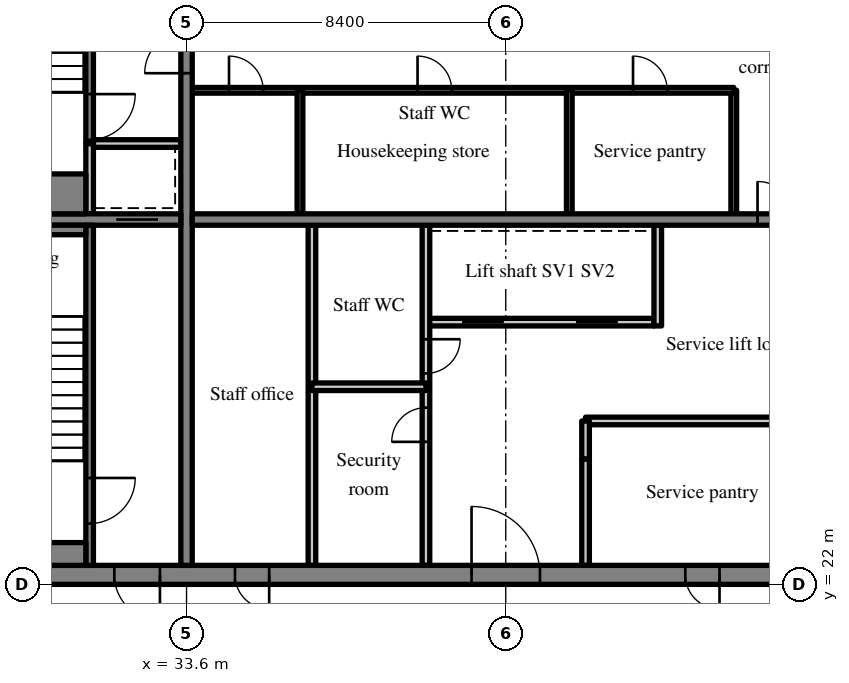
"""IFC4 building model, lengths in metres.
Left out: names, types, materials, properties, quantities, classifications, styles, units other than length and angle.
Written with IfcOpenShell. Run it as: python <this file> out.ifc"""

import sys

from ifc_helpers import new_model, si_unit, direction, frame, frame_2d, origin, place, context, subcontext, project, spatial, rectangle, extrude, source, transform, mapped, element, fill, save


model = new_model("IFC4")
c1 = context("Model", 3, precision=1e-05, world=origin(), true_north=direction((0.0, 1.0)))
c2 = subcontext(c1, "Body", "Model", "MODEL_VIEW")
j1 = project(units=[si_unit("LENGTHUNIT", "METRE"), si_unit("PLANEANGLEUNIT", "RADIAN")], contexts=[c1])
p1 = place(None, origin())
s1 = spatial("IfcSite", under=j1, at=p1, CompositionType="ELEMENT")
p2 = place(p1, origin())
s2 = spatial("IfcBuilding", under=s1, at=p2, CompositionType="ELEMENT")
p3 = place(p2, frame((0.0, 0.0, 313.7)))
s3 = spatial("IfcBuildingStorey", under=s2, at=p3, CompositionType="ELEMENT", Elevation=313.7)
m1 = source(origin(), c2, "Body", "SweptSolid", [
    extrude(rectangle(XDim=50.4, YDim=0.5, at=frame_2d((25.2, 0.0))), origin(), (0.0, 0.0, 1.0), 3.72),
])
p4 = place(p3, frame((25.2, 22.25, 0.0), z_axis=(0.0, 0.0, 1.0), x_axis=(1.0, 0.0, 0.0)))
e1 = element("IfcWall", 1, at=p4, inside=s3, PredefinedType="SHEAR", context=c2, shape_type="MappedRepresentation", body=[
    mapped(m1, transform((0.0, 0.0, 0.0), scale=1.0)),
])
m2 = source(origin(), c2, "Body", "SweptSolid", [
    extrude(rectangle(XDim=1.8, YDim=2.1, at=frame_2d((0.9, 1.05))), frame((0.0, 0.26, 0.0), z_axis=(0.0, -1.0, 0.0), x_axis=(1.0, 0.0, 0.0)), (0.0, 0.0, 1.0), 0.52),
])
p5 = place(p4, frame((15.9, 0.0, 0.0)))
e2 = element("IfcOpeningElement", 2, at=p5, cuts=e1, PredefinedType="OPENING", context=c2, shape_type="MappedRepresentation", body=[
    mapped(m2, transform((0.0, 0.0, 0.0), scale=1.0)),
])
m3 = source(origin(), c2, "Body", "SweptSolid", [
    extrude(rectangle(XDim=0.9, YDim=2.1, at=frame_2d((0.45, 1.05))), frame((0.0, 0.26, 0.0), z_axis=(0.0, -1.0, 0.0), x_axis=(1.0, 0.0, 0.0)), (0.0, 0.0, 1.0), 0.52),
])
p6 = place(p4, frame((9.675, 0.0, 0.0)))
e3 = element("IfcOpeningElement", 3, at=p6, cuts=e1, PredefinedType="OPENING", context=c2, shape_type="MappedRepresentation", body=[
    mapped(m3, transform((0.0, 0.0, 0.0), scale=1.0)),
])
p7 = place(p4, frame((21.525, 0.0, 0.0)))
e4 = element("IfcOpeningElement", 4, at=p7, cuts=e1, PredefinedType="OPENING", context=c2, shape_type="MappedRepresentation", body=[
    mapped(m3, transform((0.0, 0.0, 0.0), scale=1.0)),
])
p8 = place(p4, frame((32.7, 0.0, 0.0)))
e5 = element("IfcOpeningElement", 5, at=p8, cuts=e1, PredefinedType="OPENING", context=c2, shape_type="MappedRepresentation", body=[
    mapped(m2, transform((0.0, 0.0, 0.0), scale=1.0)),
])
m4 = source(origin(), c2, "Body", "SweptSolid", [
    extrude(rectangle(XDim=1.2, YDim=2.1, at=frame_2d((0.6, 1.05))), frame((0.0, 0.26, 0.0), z_axis=(0.0, -1.0, 0.0), x_axis=(1.0, 0.0, 0.0)), (0.0, 0.0, 1.0), 0.52),
])
p9 = place(p4, frame((6.5, 0.0, 0.0)))
e6 = element("IfcOpeningElement", 6, at=p9, cuts=e1, PredefinedType="OPENING", context=c2, shape_type="MappedRepresentation", body=[
    mapped(m4, transform((0.0, 0.0, 0.0), scale=1.0)),
])
p10 = place(p4, frame((47.975, 0.0, 0.0)))
e7 = element("IfcOpeningElement", 7, at=p10, cuts=e1, PredefinedType="OPENING", context=c2, shape_type="MappedRepresentation", body=[
    mapped(m4, transform((0.0, 0.0, 0.0), scale=1.0)),
])
m5 = source(origin(), c2, "Body", "SweptSolid", [
    extrude(rectangle(XDim=19.0, YDim=0.3, at=frame_2d((9.5, 0.0))), origin(), (0.0, 0.0, 1.0), 3.72),
])
p11 = place(p3, frame((33.6, 22.5, 0.0), z_axis=(0.0, 0.0, 1.0), x_axis=(0.0, 1.0, 0.0)))
e8 = element("IfcWall", 8, at=p11, inside=s3, PredefinedType="SHEAR", context=c2, shape_type="MappedRepresentation", body=[
    mapped(m5, transform((0.0, 0.0, 0.0), scale=1.0)),
])
m6 = source(origin(), c2, "Body", "SweptSolid", [
    extrude(rectangle(XDim=1.1, YDim=2.1, at=frame_2d((0.55, 1.05))), frame((0.0, 0.16, 0.0), z_axis=(0.0, -1.0, 0.0), x_axis=(1.0, 0.0, 0.0)), (0.0, 0.0, 1.0), 0.32),
])
p12 = place(p11, frame((12.95, 0.0, 0.0)))
e9 = element("IfcOpeningElement", 9, at=p12, cuts=e8, PredefinedType="OPENING", context=c2, shape_type="MappedRepresentation", body=[
    mapped(m6, transform((0.0, 0.0, 0.0), scale=1.0)),
])
m7 = source(origin(), c2, "Body", "SweptSolid", [
    extrude(rectangle(XDim=7.75, YDim=0.3, at=frame_2d((3.875, 0.0))), origin(), (0.0, 0.0, 1.0), 3.72),
])
p13 = place(p3, frame((25.7, 31.6, 0.0), z_axis=(0.0, 0.0, 1.0), x_axis=(1.0, 0.0, 0.0)))
e10 = element("IfcWall", 10, at=p13, inside=s3, PredefinedType="SHEAR", context=c2, shape_type="MappedRepresentation", body=[
    mapped(m7, transform((0.0, 0.0, 0.0), scale=1.0)),
])
p14 = place(p13, frame((6.05, 0.0, 0.0)))
e11 = element("IfcOpeningElement", 11, at=p14, cuts=e10, PredefinedType="OPENING", context=c2, shape_type="MappedRepresentation", body=[
    mapped(m6, transform((0.0, 0.0, 0.0), scale=1.0)),
])
m8 = source(origin(), c2, "Body", "SweptSolid", [
    extrude(rectangle(XDim=16.5, YDim=0.3, at=frame_2d((8.25, 0.0))), origin(), (0.0, 0.0, 1.0), 3.72),
])
p15 = place(p3, frame((33.75, 31.6, 0.0), z_axis=(0.0, 0.0, 1.0), x_axis=(1.0, 0.0, 0.0)))
e12 = element("IfcWall", 12, at=p15, inside=s3, PredefinedType="SHEAR", context=c2, shape_type="MappedRepresentation", body=[
    mapped(m8, transform((0.0, 0.0, 0.0), scale=1.0)),
])
m9 = source(origin(), c2, "Body", "SweptSolid", [
    extrude(rectangle(XDim=1.0, YDim=2.1, at=frame_2d((0.5, 1.05))), frame((0.0, 0.16, 0.0), z_axis=(0.0, -1.0, 0.0), x_axis=(1.0, 0.0, 0.0)), (0.0, 0.0, 1.0), 0.32),
])
p16 = place(p15, frame((14.875, 0.0, 0.0)))
e13 = element("IfcOpeningElement", 13, at=p16, cuts=e12, PredefinedType="OPENING", context=c2, shape_type="MappedRepresentation", body=[
    mapped(m9, transform((0.0, 0.0, 0.0), scale=1.0)),
])
m10 = source(origin(), c2, "Body", "SweptSolid", [
    extrude(rectangle(XDim=6.0, YDim=0.2, at=frame_2d((3.0, 0.0))), origin(), (0.0, 0.0, 1.0), 3.72),
])
p17 = place(p3, frame((39.9, 28.9, 0.0), z_axis=(0.0, 0.0, 1.0), x_axis=(1.0, 0.0, 0.0)))
e14 = element("IfcWall", 14, at=p17, inside=s3, PredefinedType="SOLIDWALL", context=c2, shape_type="MappedRepresentation", body=[
    mapped(m10, transform((0.0, 0.0, 0.0), scale=1.0)),
])
m11 = source(origin(), c2, "Body", "SweptSolid", [
    extrude(rectangle(XDim=1.1, YDim=2.1, at=frame_2d((0.55, 1.05))), frame((0.0, 0.11, 0.0), z_axis=(0.0, -1.0, 0.0), x_axis=(1.0, 0.0, 0.0)), (0.0, 0.0, 1.0), 0.22),
])
p18 = place(p17, frame((0.95, 0.0, 0.0)))
e15 = element("IfcOpeningElement", 15, at=p18, cuts=e14, PredefinedType="OPENING", context=c2, shape_type="MappedRepresentation", body=[
    mapped(m11, transform((0.0, 0.0, 0.0), scale=1.0)),
])
p19 = place(p17, frame((3.95, 0.0, 0.0)))
e16 = element("IfcOpeningElement", 16, at=p19, cuts=e14, PredefinedType="OPENING", context=c2, shape_type="MappedRepresentation", body=[
    mapped(m11, transform((0.0, 0.0, 0.0), scale=1.0)),
])
m12 = source(origin(), c2, "Body", "SweptSolid", [
    extrude(rectangle(XDim=8.95, YDim=0.2, at=frame_2d((4.475, 0.0))), origin(), (0.0, 0.0, 1.0), 3.72),
])
p20 = place(p3, frame((39.9, 22.5, 0.0), z_axis=(0.0, 0.0, 1.0), x_axis=(0.0, 1.0, 0.0)))
e17 = element("IfcWall", 17, at=p20, inside=s3, PredefinedType="PARTITIONING", context=c2, shape_type="MappedRepresentation", body=[
    mapped(m12, transform((0.0, 0.0, 0.0), scale=1.0)),
])
m13 = source(origin(), c2, "Body", "SweptSolid", [
    extrude(rectangle(XDim=0.9, YDim=2.1, at=frame_2d((0.45, 1.05))), frame((0.0, 0.11, 0.0), z_axis=(0.0, -1.0, 0.0), x_axis=(1.0, 0.0, 0.0)), (0.0, 0.0, 1.0), 0.22),
])
p21 = place(p20, frame((3.25, 0.0, 0.0)))
e18 = element("IfcOpeningElement", 18, at=p21, cuts=e17, PredefinedType="OPENING", context=c2, shape_type="MappedRepresentation", body=[
    mapped(m13, transform((0.0, 0.0, 0.0), scale=1.0)),
])
p22 = place(p20, frame((5.05, 0.0, 0.0)))
e19 = element("IfcOpeningElement", 19, at=p22, cuts=e17, PredefinedType="OPENING", context=c2, shape_type="MappedRepresentation", body=[
    mapped(m13, transform((0.0, 0.0, 0.0), scale=1.0)),
])
m14 = source(origin(), c2, "Body", "SweptSolid", [
    extrude(rectangle(XDim=2.8, YDim=0.2, at=frame_2d((1.4, 0.0))), origin(), (0.0, 0.0, 1.0), 3.72),
])
p23 = place(p3, frame((44.1, 22.5, 0.0), z_axis=(0.0, 0.0, 1.0), x_axis=(0.0, 1.0, 0.0)))
e20 = element("IfcWall", 20, at=p23, inside=s3, PredefinedType="PARTITIONING", context=c2, shape_type="MappedRepresentation", body=[
    mapped(m14, transform((0.0, 0.0, 0.0), scale=1.0)),
])
m15 = source(origin(), c2, "Body", "SweptSolid", [
    extrude(rectangle(XDim=2.65, YDim=0.2, at=frame_2d((1.325, 0.0))), origin(), (0.0, 0.0, 1.0), 3.72),
])
p24 = place(p3, frame((46.0, 28.8, 0.0), z_axis=(0.0, 0.0, 1.0), x_axis=(0.0, 1.0, 0.0)))
e21 = element("IfcWall", 21, at=p24, inside=s3, PredefinedType="SOLIDWALL", context=c2, shape_type="MappedRepresentation", body=[
    mapped(m15, transform((0.0, 0.0, 0.0), scale=1.0)),
])
p25 = place(p3, frame((36.9, 22.5, 0.0), z_axis=(0.0, 0.0, 1.0), x_axis=(0.0, 1.0, 0.0)))
e22 = element("IfcWall", 22, at=p25, inside=s3, PredefinedType="PARTITIONING", context=c2, shape_type="MappedRepresentation", body=[
    mapped(m12, transform((0.0, 0.0, 0.0), scale=1.0)),
])
m16 = source(origin(), c2, "Body", "SweptSolid", [
    extrude(rectangle(XDim=3.0, YDim=0.2, at=frame_2d((1.5, 0.0))), origin(), (0.0, 0.0, 1.0), 3.72),
])
p26 = place(p3, frame((36.9, 27.2, 0.0), z_axis=(0.0, 0.0, 1.0), x_axis=(1.0, 0.0, 0.0)))
e23 = element("IfcWall", 23, at=p26, inside=s3, PredefinedType="PARTITIONING", context=c2, shape_type="MappedRepresentation", body=[
    mapped(m16, transform((0.0, 0.0, 0.0), scale=1.0)),
])
m17 = source(origin(), c2, "Body", "SweptSolid", [
    extrude(rectangle(XDim=6.15, YDim=0.2, at=frame_2d((3.075, 0.0))), origin(), (0.0, 0.0, 1.0), 3.72),
])
p27 = place(p3, frame((44.1, 26.3, 0.0), z_axis=(0.0, 0.0, 1.0), x_axis=(1.0, 0.0, 0.0)))
e24 = element("IfcWall", 24, at=p27, inside=s3, PredefinedType="PARTITIONING", context=c2, shape_type="MappedRepresentation", body=[
    mapped(m17, transform((0.0, 0.0, 0.0), scale=1.0)),
])
m18 = source(origin(), c2, "Body", "SweptSolid", [
    extrude(rectangle(XDim=1.0, YDim=0.2, at=frame_2d((0.5, 0.0))), origin(), (0.0, 0.0, 1.0), 3.72),
])
p28 = place(p3, frame((44.1, 25.3, 0.0), z_axis=(0.0, 0.0, 1.0), x_axis=(0.0, 1.0, 0.0)))
e25 = element("IfcWall", 25, at=p28, inside=s3, PredefinedType="PARTITIONING", context=c2, shape_type="MappedRepresentation", body=[
    mapped(m18, transform((0.0, 0.0, 0.0), scale=1.0)),
])
m19 = source(origin(), c2, "Body", "SweptSolid", [
    extrude(rectangle(XDim=3.25, YDim=0.15, at=frame_2d((1.625, 0.0))), origin(), (0.0, 0.0, 1.0), 3.72),
])
p29 = place(p3, frame((48.0, 31.75, 0.0), z_axis=(0.0, 0.0, 1.0), x_axis=(0.0, 1.0, 0.0)))
e26 = element("IfcWall", 26, at=p29, inside=s3, PredefinedType="PARTITIONING", context=c2, shape_type="MappedRepresentation", body=[
    mapped(m19, transform((0.0, 0.0, 0.0), scale=1.0)),
])
m20 = source(origin(), c2, "Body", "SweptSolid", [
    extrude(rectangle(XDim=14.25, YDim=0.15, at=frame_2d((7.125, 0.0))), origin(), (0.0, 0.0, 1.0), 3.72),
])
p30 = place(p3, frame((33.75, 35.0, 0.0), z_axis=(0.0, 0.0, 1.0), x_axis=(1.0, 0.0, 0.0)))
e27 = element("IfcWall", 27, at=p30, inside=s3, PredefinedType="PARTITIONING", context=c2, shape_type="MappedRepresentation", body=[
    mapped(m20, transform((0.0, 0.0, 0.0), scale=1.0)),
])
m21 = source(origin(), c2, "Body", "SweptSolid", [
    extrude(rectangle(XDim=0.9, YDim=2.1, at=frame_2d((0.45, 1.05))), frame((0.0, 0.085, 0.0), z_axis=(0.0, -1.0, 0.0), x_axis=(1.0, 0.0, 0.0)), (0.0, 0.0, 1.0), 0.17),
])
p31 = place(p30, frame((0.968, 0.0, 0.0)))
e28 = element("IfcOpeningElement", 28, at=p31, cuts=e27, PredefinedType="OPENING", context=c2, shape_type="MappedRepresentation", body=[
    mapped(m21, transform((0.0, 0.0, 0.0), scale=1.0)),
])
p32 = place(p30, frame((5.929, 0.0, 0.0)))
e29 = element("IfcOpeningElement", 29, at=p32, cuts=e27, PredefinedType="OPENING", context=c2, shape_type="MappedRepresentation", body=[
    mapped(m21, transform((0.0, 0.0, 0.0), scale=1.0)),
])
p33 = place(p30, frame((11.599, 0.0, 0.0)))
e30 = element("IfcOpeningElement", 30, at=p33, cuts=e27, PredefinedType="OPENING", context=c2, shape_type="MappedRepresentation", body=[
    mapped(m21, transform((0.0, 0.0, 0.0), scale=1.0)),
])
for number, where, z_axis, x_axis in (
    (31, (36.585, 31.75, 0.0), (0.0, 0.0, 1.0), (0.0, 1.0, 0.0)),
    (32, (43.672, 31.75, 0.0), (0.0, 0.0, 1.0), (0.0, 1.0, 0.0)),
):
    element("IfcWall", number, at=place(p3, frame(where, z_axis=z_axis, x_axis=x_axis)), inside=s3, PredefinedType="PARTITIONING", context=c2, shape_type="MappedRepresentation", body=[
        mapped(m19, transform((0.0, 0.0, 0.0), scale=1.0)),
    ])
m22 = source(origin(), c2, "Body", "SweptSolid", [
    extrude(rectangle(XDim=8.95, YDim=0.2, at=frame_2d((4.475, 0.0))), origin(), (0.0, 0.0, 1.0), 3.72),
])
p34 = place(p3, frame((31.05, 22.5, 0.0), z_axis=(0.0, 0.0, 1.0), x_axis=(0.0, 1.0, 0.0)))
e33 = element("IfcWall", 33, at=p34, inside=s3, PredefinedType="SOLIDWALL", context=c2, shape_type="MappedRepresentation", body=[
    mapped(m22, transform((0.0, 0.0, 0.0), scale=1.0)),
])
m23 = source(origin(), c2, "Body", "SweptSolid", [
    extrude(rectangle(XDim=1.2, YDim=2.1, at=frame_2d((0.6, 1.05))), frame((0.0, 0.11, 0.0), z_axis=(0.0, -1.0, 0.0), x_axis=(1.0, 0.0, 0.0)), (0.0, 0.0, 1.0), 0.22),
])
p35 = place(p34, frame((1.1, 0.0, 0.0)))
e34 = element("IfcOpeningElement", 34, at=p35, cuts=e33, PredefinedType="OPENING", context=c2, shape_type="MappedRepresentation", body=[
    mapped(m23, transform((0.0, 0.0, 0.0), scale=1.0)),
])
m24 = source(origin(), c2, "Body", "SweptSolid", [
    extrude(rectangle(XDim=1.85, YDim=0.2, at=frame_2d((0.925, 0.0))), origin(), (0.0, 0.0, 1.0), 3.72),
])
p36 = place(p3, frame((31.05, 31.75, 0.0), z_axis=(0.0, 0.0, 1.0), x_axis=(0.0, 1.0, 0.0)))
e35 = element("IfcWall", 35, at=p36, inside=s3, PredefinedType="SOLIDWALL", context=c2, shape_type="MappedRepresentation", body=[
    mapped(m24, transform((0.0, 0.0, 0.0), scale=1.0)),
])
m25 = source(origin(), c2, "Body", "SweptSolid", [
    extrude(rectangle(XDim=2.3, YDim=0.2, at=frame_2d((1.15, 0.0))), origin(), (0.0, 0.0, 1.0), 3.72),
])
p37 = place(p3, frame((31.15, 33.6, 0.0), z_axis=(0.0, 0.0, 1.0), x_axis=(1.0, 0.0, 0.0)))
e36 = element("IfcWall", 36, at=p37, inside=s3, PredefinedType="SOLIDWALL", context=c2, shape_type="MappedRepresentation", body=[
    mapped(m25, transform((0.0, 0.0, 0.0), scale=1.0)),
])
m26 = source(origin(), c2, "Body", "SweptSolid", [
    extrude(rectangle(XDim=7.9, YDim=0.2, at=frame_2d((3.95, 0.0))), origin(), (0.0, 0.0, 1.0), 3.72),
])
p38 = place(p3, frame((31.05, 33.6, 0.0), z_axis=(0.0, 0.0, 1.0), x_axis=(0.0, 1.0, 0.0)))
e37 = element("IfcWall", 37, at=p38, inside=s3, PredefinedType="SOLIDWALL", context=c2, shape_type="MappedRepresentation", body=[
    mapped(m26, transform((0.0, 0.0, 0.0), scale=1.0)),
])
p39 = place(p38, frame((0.1, 0.0, 0.0)))
e38 = element("IfcOpeningElement", 38, at=p39, cuts=e37, PredefinedType="OPENING", context=c2, shape_type="MappedRepresentation", body=[
    mapped(m23, transform((0.0, 0.0, 0.0), scale=1.0)),
])
m27 = source(origin(), c2, "Body", "SweptSolid", [
    extrude(rectangle(XDim=5.25, YDim=0.6, at=frame_2d((2.625, 0.0))), origin(), (0.0, 0.0, 1.0), 3.72),
])
p40 = place(p3, frame((25.7, 22.8, 0.0), z_axis=(0.0, 0.0, 1.0), x_axis=(1.0, 0.0, 0.0)))
e39 = element("IfcWall", 39, at=p40, inside=s3, PredefinedType="SOLIDWALL", context=c2, shape_type="MappedRepresentation", body=[
    mapped(m27, transform((0.0, 0.0, 0.0), scale=1.0)),
])
m28 = source(origin(), c2, "Body", "SweptSolid", [
    extrude(rectangle(XDim=5.25, YDim=0.25, at=frame_2d((2.625, 0.0))), origin(), (0.0, 0.0, 1.0), 3.72),
])
p41 = place(p3, frame((25.7, 31.325, 0.0), z_axis=(0.0, 0.0, 1.0), x_axis=(1.0, 0.0, 0.0)))
e40 = element("IfcWall", 40, at=p41, inside=s3, PredefinedType="SOLIDWALL", context=c2, shape_type="MappedRepresentation", body=[
    mapped(m28, transform((0.0, 0.0, 0.0), scale=1.0)),
])
m29 = source(origin(), c2, "Body", "SweptSolid", [
    extrude(rectangle(XDim=5.25, YDim=1.05, at=frame_2d((2.625, 0.0))), origin(), (0.0, 0.0, 1.0), 3.72),
])
p42 = place(p3, frame((25.7, 32.275, 0.0), z_axis=(0.0, 0.0, 1.0), x_axis=(1.0, 0.0, 0.0)))
e41 = element("IfcWall", 41, at=p42, inside=s3, PredefinedType="SOLIDWALL", context=c2, shape_type="MappedRepresentation", body=[
    mapped(m29, transform((0.0, 0.0, 0.0), scale=1.0)),
])
m30 = source(origin(), c2, "Body", "SweptSolid", [
    extrude(rectangle(XDim=1.8, YDim=2.1, at=frame_2d((0.9, 1.05))), frame((0.0, 0.175, 0.0), z_axis=(0.0, -1.0, 0.0), x_axis=(1.0, 0.0, 0.0)), (0.0, 0.0, 1.0), 0.05),
])
p43 = place(p5, origin())
e42 = element("IfcDoor", 42, at=p43, inside=s3, OperationType="DOUBLE_DOOR_SINGLE_SWING", PredefinedType="DOOR", context=c2, shape_type="MappedRepresentation", body=[
    mapped(m30, transform((0.0, 0.0, 0.0), scale=1.0)),
])
fill(e2, e42)
m31 = source(origin(), c2, "Body", "SweptSolid", [
    extrude(rectangle(XDim=1.0, YDim=2.1, at=frame_2d((0.5, 1.05))), frame((0.0, 0.025, 0.0), z_axis=(0.0, -1.0, 0.0), x_axis=(1.0, 0.0, 0.0)), (0.0, 0.0, 1.0), 0.05),
])
p44 = place(p16, origin())
e43 = element("IfcDoor", 43, at=p44, inside=s3, OperationType="SINGLE_SWING_LEFT", PredefinedType="DOOR", context=c2, shape_type="MappedRepresentation", body=[
    mapped(m31, transform((0.0, 0.0, 0.0), scale=1.0)),
])
fill(e13, e43)
m32 = source(origin(), c2, "Body", "SweptSolid", [
    extrude(rectangle(XDim=1.1, YDim=2.1, at=frame_2d((0.55, 1.05))), frame((0.0, 0.025, 0.0), z_axis=(0.0, -1.0, 0.0), x_axis=(1.0, 0.0, 0.0)), (0.0, 0.0, 1.0), 0.05),
])
p45 = place(p18, origin())
e44 = element("IfcDoor", 44, at=p45, inside=s3, OperationType="SLIDING_TO_LEFT", PredefinedType="DOOR", context=c2, shape_type="MappedRepresentation", body=[
    mapped(m32, transform((0.0, 0.0, 0.0), scale=1.0)),
])
fill(e15, e44)
p46 = place(p19, origin())
e45 = element("IfcDoor", 45, at=p46, inside=s3, OperationType="SLIDING_TO_RIGHT", PredefinedType="DOOR", context=c2, shape_type="MappedRepresentation", body=[
    mapped(m32, transform((0.0, 0.0, 0.0), scale=1.0)),
])
fill(e16, e45)
m33 = source(origin(), c2, "Body", "SweptSolid", [
    extrude(rectangle(XDim=0.9, YDim=2.1, at=frame_2d((0.45, 1.05))), frame((0.0, 0.175, 0.0), z_axis=(0.0, -1.0, 0.0), x_axis=(1.0, 0.0, 0.0)), (0.0, 0.0, 1.0), 0.05),
])
p47 = place(p6, origin())
e46 = element("IfcDoor", 46, at=p47, inside=s3, OperationType="SINGLE_SWING_RIGHT", PredefinedType="DOOR", context=c2, shape_type="MappedRepresentation", body=[
    mapped(m33, transform((0.0, 0.0, 0.0), scale=1.0)),
])
fill(e3, e46)
m34 = source(origin(), c2, "Body", "SweptSolid", [
    extrude(rectangle(XDim=0.9, YDim=2.1, at=frame_2d((0.45, 1.05))), frame((0.0, 0.025, 0.0), z_axis=(0.0, -1.0, 0.0), x_axis=(1.0, 0.0, 0.0)), (0.0, 0.0, 1.0), 0.05),
])
p48 = place(p21, origin())
e47 = element("IfcDoor", 47, at=p48, inside=s3, OperationType="SINGLE_SWING_LEFT", PredefinedType="DOOR", context=c2, shape_type="MappedRepresentation", body=[
    mapped(m34, transform((0.0, 0.0, 0.0), scale=1.0)),
])
fill(e18, e47)
p49 = place(p22, origin())
e48 = element("IfcDoor", 48, at=p49, inside=s3, OperationType="SINGLE_SWING_RIGHT", PredefinedType="DOOR", context=c2, shape_type="MappedRepresentation", body=[
    mapped(m34, transform((0.0, 0.0, 0.0), scale=1.0)),
])
fill(e19, e48)
p50 = place(p7, origin())
e49 = element("IfcDoor", 49, at=p50, inside=s3, OperationType="SINGLE_SWING_RIGHT", PredefinedType="DOOR", context=c2, shape_type="MappedRepresentation", body=[
    mapped(m33, transform((0.0, 0.0, 0.0), scale=1.0)),
])
fill(e4, e49)
p51 = place(p31, origin())
e50 = element("IfcDoor", 50, at=p51, inside=s3, OperationType="SINGLE_SWING_LEFT", PredefinedType="DOOR", context=c2, shape_type="MappedRepresentation", body=[
    mapped(m34, transform((0.0, 0.0, 0.0), scale=1.0)),
])
fill(e28, e50)
p52 = place(p32, origin())
e51 = element("IfcDoor", 51, at=p52, inside=s3, OperationType="SINGLE_SWING_LEFT", PredefinedType="DOOR", context=c2, shape_type="MappedRepresentation", body=[
    mapped(m34, transform((0.0, 0.0, 0.0), scale=1.0)),
])
fill(e29, e51)
p53 = place(p33, origin())
e52 = element("IfcDoor", 52, at=p53, inside=s3, OperationType="SINGLE_SWING_LEFT", PredefinedType="DOOR", context=c2, shape_type="MappedRepresentation", body=[
    mapped(m34, transform((0.0, 0.0, 0.0), scale=1.0)),
])
fill(e30, e52)
m35 = source(origin(), c2, "Body", "SweptSolid", [
    extrude(rectangle(XDim=1.2, YDim=2.1, at=frame_2d((0.6, 1.05))), frame((0.0, 0.025, 0.0), z_axis=(0.0, -1.0, 0.0), x_axis=(1.0, 0.0, 0.0)), (0.0, 0.0, 1.0), 0.05),
])
p54 = place(p35, origin())
e53 = element("IfcDoor", 53, at=p54, inside=s3, OperationType="SINGLE_SWING_RIGHT", PredefinedType="DOOR", context=c2, shape_type="MappedRepresentation", body=[
    mapped(m35, transform((0.0, 0.0, 0.0), scale=1.0)),
])
fill(e34, e53)
m36 = source(origin(), c2, "Body", "SweptSolid", [
    extrude(rectangle(XDim=1.2, YDim=2.1, at=frame_2d((0.6, 1.05))), frame((0.0, 0.175, 0.0), z_axis=(0.0, -1.0, 0.0), x_axis=(1.0, 0.0, 0.0)), (0.0, 0.0, 1.0), 0.05),
])
p55 = place(p9, origin())
e54 = element("IfcDoor", 54, at=p55, inside=s3, OperationType="SINGLE_SWING_RIGHT", PredefinedType="DOOR", context=c2, shape_type="MappedRepresentation", body=[
    mapped(m36, transform((0.0, 0.0, 0.0), scale=1.0)),
])
fill(e6, e54)
p56 = place(p14, origin())
e55 = element("IfcDoor", 55, at=p56, inside=s3, OperationType="SLIDING_TO_RIGHT", PredefinedType="DOOR", context=c2, shape_type="MappedRepresentation", body=[
    mapped(m32, transform((0.0, 0.0, 0.0), scale=1.0)),
])
fill(e11, e55)
p57 = place(p39, origin())
e56 = element("IfcDoor", 56, at=p57, inside=s3, OperationType="SINGLE_SWING_RIGHT", PredefinedType="DOOR", context=c2, shape_type="MappedRepresentation", body=[
    mapped(m35, transform((0.0, 0.0, 0.0), scale=1.0)),
])
fill(e38, e56)
p58 = place(p12, origin())
e57 = element("IfcDoor", 57, at=p58, inside=s3, OperationType="SINGLE_SWING_LEFT", PredefinedType="DOOR", context=c2, shape_type="MappedRepresentation", body=[
    mapped(m32, transform((0.0, 0.0, 0.0), scale=1.0)),
])
fill(e9, e57)
save(model, sys.argv[1])
